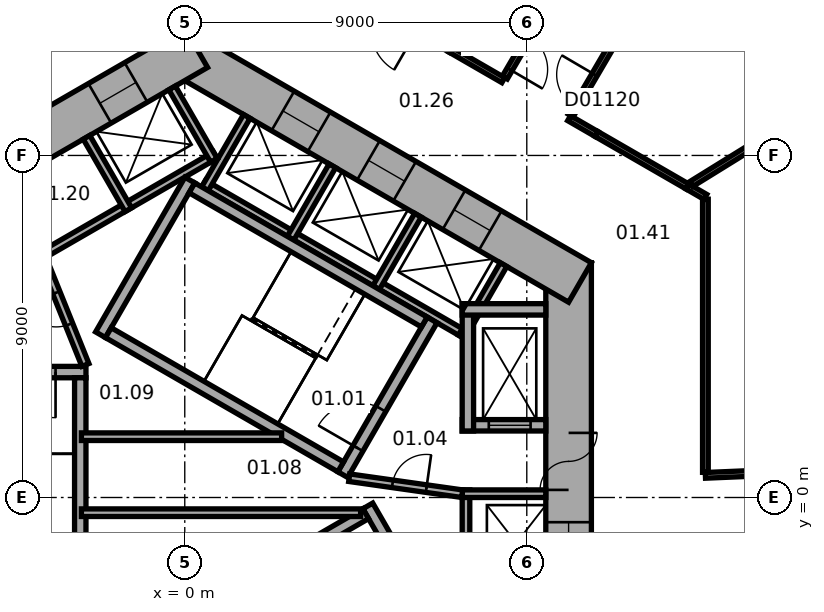
"""IFC4 building model, lengths in metres.
Left out: names, types, materials, properties, quantities, classifications, styles, units other than length and angle.
Written with IfcOpenShell. Run it as: python <this file> out.ifc"""

import sys

from ifc_helpers import new_model, si_unit, direction, frame, frame_2d, origin, place, context, subcontext, project, spatial, rectangle, extrude, element, fill, save


model = new_model("IFC4")
c1 = context("Model", 3, precision=1e-05, world=origin(), true_north=direction((0.0, 1.0)))
c2 = subcontext(c1, "Body", "Model", "MODEL_VIEW")
j1 = project(units=[si_unit("LENGTHUNIT", "METRE"), si_unit("PLANEANGLEUNIT", "RADIAN")], contexts=[c1])
p1 = place(None, origin())
s1 = spatial("IfcSite", under=j1, at=p1, CompositionType="ELEMENT")
p2 = place(p1, origin())
s2 = spatial("IfcBuilding", under=s1, at=p2, CompositionType="ELEMENT")
p3 = place(p2, frame((0.0, 0.0, 7.5)))
s3 = spatial("IfcBuildingStorey", under=s2, at=p3, CompositionType="ELEMENT", Elevation=7.5)
p4 = place(p3, frame((10.1, -6.177, 0.0), z_axis=(0.0, 0.0, 1.0), x_axis=(0.0, 1.0, 0.0)))
e1 = element("IfcWall", 1, at=p4, inside=s3, PredefinedType="SHEAR", context=c2, shape_type="SweptSolid", body=[
    extrude(rectangle(XDim=12.355, YDim=1.2, at=frame_2d((6.177, 0.0))), origin(), (0.0, 0.0, 1.0), 5.5),
])
p5 = place(p4, frame((6.378, 0.0, 0.0)))
e2 = element("IfcOpeningElement", 2, at=p5, cuts=e1, PredefinedType="OPENING", context=c2, shape_type="SweptSolid", body=[
    extrude(rectangle(XDim=1.5, YDim=2.1, at=frame_2d((0.75, 1.05))), frame((0.0, 0.61, 0.0), z_axis=(0.0, -1.0, 0.0), x_axis=(1.0, 0.0, 0.0)), (0.0, 0.0, 1.0), 1.22),
])
p6 = place(p4, frame((1.828, 0.0, 0.0)))
e3 = element("IfcOpeningElement", 3, at=p6, cuts=e1, PredefinedType="OPENING", context=c2, shape_type="SweptSolid", body=[
    extrude(rectangle(XDim=1.1, YDim=2.1, at=frame_2d((0.55, 1.05))), frame((0.0, 0.61, 0.0), z_axis=(0.0, -1.0, 0.0), x_axis=(1.0, 0.0, 0.0)), (0.0, 0.0, 1.0), 1.22),
])
p7 = place(p4, frame((4.427, 0.0, 0.0)))
e4 = element("IfcOpeningElement", 4, at=p7, cuts=e1, PredefinedType="OPENING", context=c2, shape_type="SweptSolid", body=[
    extrude(rectangle(XDim=1.1, YDim=2.1, at=frame_2d((0.55, 1.05))), frame((0.0, 0.61, 0.0), z_axis=(0.0, -1.0, 0.0), x_axis=(1.0, 0.0, 0.0)), (0.0, 0.0, 1.0), 1.22),
])
p8 = place(p3, frame((10.4, 5.658, 0.0), z_axis=(0.0, 0.0, 1.0), x_axis=(-0.866021384402, 0.500006961711, 0.0)))
e5 = element("IfcWall", 5, at=p8, inside=s3, PredefinedType="SHEAR", context=c2, shape_type="SweptSolid", body=[
    extrude(rectangle(XDim=12.355, YDim=1.2, at=frame_2d((6.178, 0.0))), origin(), (0.0, 0.0, 1.0), 5.5),
])
p9 = place(p8, frame((2.728, 0.0, 0.0)))
e6 = element("IfcOpeningElement", 6, at=p9, cuts=e5, PredefinedType="OPENING", context=c2, shape_type="SweptSolid", body=[
    extrude(rectangle(XDim=1.1, YDim=2.1, at=frame_2d((0.55, 1.05))), frame((0.0, 0.61, 0.0), z_axis=(0.0, -1.0, 0.0), x_axis=(1.0, 0.0, 0.0)), (0.0, 0.0, 1.0), 1.22),
])
p10 = place(p8, frame((5.328, 0.0, 0.0)))
e7 = element("IfcOpeningElement", 7, at=p10, cuts=e5, PredefinedType="OPENING", context=c2, shape_type="SweptSolid", body=[
    extrude(rectangle(XDim=1.1, YDim=2.1, at=frame_2d((0.55, 1.05))), frame((0.0, 0.61, 0.0), z_axis=(0.0, -1.0, 0.0), x_axis=(1.0, 0.0, 0.0)), (0.0, 0.0, 1.0), 1.22),
])
p11 = place(p8, frame((7.928, 0.0, 0.0)))
e8 = element("IfcOpeningElement", 8, at=p11, cuts=e5, PredefinedType="OPENING", context=c2, shape_type="SweptSolid", body=[
    extrude(rectangle(XDim=1.1, YDim=2.1, at=frame_2d((0.55, 1.05))), frame((0.0, 0.61, 0.0), z_axis=(0.0, -1.0, 0.0), x_axis=(1.0, 0.0, 0.0)), (0.0, 0.0, 1.0), 1.22),
])
p12 = place(p3, frame((0.3, 11.836, 0.0), z_axis=(0.0, 0.0, 1.0), x_axis=(-0.866021384402, -0.500006961711, 0.0)))
e9 = element("IfcWall", 9, at=p12, inside=s3, PredefinedType="SHEAR", context=c2, shape_type="SweptSolid", body=[
    extrude(rectangle(XDim=12.355, YDim=1.2, at=frame_2d((6.178, 0.0))), origin(), (0.0, 0.0, 1.0), 5.5),
])
p13 = place(p12, frame((6.378, 0.0, 0.0)))
e10 = element("IfcOpeningElement", 10, at=p13, cuts=e9, PredefinedType="OPENING", context=c2, shape_type="SweptSolid", body=[
    extrude(rectangle(XDim=1.5, YDim=2.1, at=frame_2d((0.75, 1.05))), frame((0.0, 0.61, 0.0), z_axis=(0.0, -1.0, 0.0), x_axis=(1.0, 0.0, 0.0)), (0.0, 0.0, 1.0), 1.22),
])
p14 = place(p12, frame((1.828, 0.0, 0.0)))
e11 = element("IfcOpeningElement", 11, at=p14, cuts=e9, PredefinedType="OPENING", context=c2, shape_type="SweptSolid", body=[
    extrude(rectangle(XDim=1.1, YDim=2.1, at=frame_2d((0.55, 1.05))), frame((0.0, 0.61, 0.0), z_axis=(0.0, -1.0, 0.0), x_axis=(1.0, 0.0, 0.0)), (0.0, 0.0, 1.0), 1.22),
])
p15 = place(p3, frame((7.4, -5.2, 0.0), z_axis=(0.0, 0.0, 1.0), x_axis=(0.0, 1.0, 0.0)))
e12 = element("IfcWall", 12, at=p15, inside=s3, PredefinedType="PARTITIONING", context=c2, shape_type="SweptSolid", body=[
    extrude(rectangle(XDim=5.4, YDim=0.2, at=frame_2d((2.7, 0.0))), origin(), (0.0, 0.0, 1.0), 5.2),
])
p16 = place(p3, frame((7.3, 0.1, 0.0), z_axis=(0.0, 0.0, 1.0), x_axis=(1.0, 0.0, 0.0)))
e13 = element("IfcWall", 13, at=p16, inside=s3, PredefinedType="PARTITIONING", context=c2, shape_type="SweptSolid", body=[
    extrude(rectangle(XDim=2.2, YDim=0.2, at=frame_2d((1.1, 0.0))), origin(), (0.0, 0.0, 1.0), 5.2),
])
p17 = place(p3, frame((7.424, 4.259, 0.0), z_axis=(0.0, 0.0, 1.0), x_axis=(-0.866026010844, 0.49999894854, 0.0)))
e14 = element("IfcWall", 14, at=p17, inside=s3, PredefinedType="PARTITIONING", context=c2, shape_type="SweptSolid", body=[
    extrude(rectangle(XDim=8.0, YDim=0.2, at=frame_2d((4.0, 0.0))), origin(), (0.0, 0.0, 1.0), 5.2),
])
for number, where, z_axis, x_axis in (
    (15, (7.287, 4.222, 0.0), (0.0, 0.0, 1.0), (0.5, 0.866, 0.0)),
    (16, (5.036, 5.522, 0.0), (0.0, 0.0, 1.0), (0.5, 0.866, 0.0)),
    (17, (2.784, 6.822, 0.0), (0.0, 0.0, 1.0), (0.5, 0.866, 0.0)),
    (18, (0.532, 8.122, 0.0), (0.0, 0.0, 1.0), (0.5, 0.866, 0.0)),
):
    element("IfcWall", number, at=place(p3, frame(where, z_axis=z_axis, x_axis=x_axis)), inside=s3, PredefinedType="PARTITIONING", context=c2, shape_type="SweptSolid", body=[
        extrude(rectangle(XDim=2.2, YDim=0.2, at=frame_2d((1.1, 0.0))), origin(), (0.0, 0.0, 1.0), 5.2),
    ])
p18 = place(p3, frame((0.803, 9.009, 0.0), z_axis=(0.0, 0.0, 1.0), x_axis=(-0.866028230842, -0.499995103361, 0.0)))
e19 = element("IfcWall", 19, at=p18, inside=s3, PredefinedType="PARTITIONING", context=c2, shape_type="SweptSolid", body=[
    extrude(rectangle(XDim=5.4, YDim=0.2, at=frame_2d((2.7, 0.0))), origin(), (0.0, 0.0, 1.0), 5.2),
])
p19 = place(p3, frame((0.767, 8.872, 0.0), z_axis=(0.0, 0.0, 1.0), x_axis=(-0.499994660107, 0.866028486751, 0.0)))
e20 = element("IfcWall", 20, at=p19, inside=s3, PredefinedType="PARTITIONING", context=c2, shape_type="SweptSolid", body=[
    extrude(rectangle(XDim=2.2, YDim=0.2, at=frame_2d((1.1, 0.0))), origin(), (0.0, 0.0, 1.0), 5.2),
])
p20 = place(p3, frame((-1.485, 7.572, 0.0), z_axis=(0.0, 0.0, 1.0), x_axis=(-0.50002983664, 0.866008176907, 0.0)))
e21 = element("IfcWall", 21, at=p20, inside=s3, PredefinedType="PARTITIONING", context=c2, shape_type="SweptSolid", body=[
    extrude(rectangle(XDim=2.2, YDim=0.2, at=frame_2d((1.1, 0.0))), origin(), (0.0, 0.0, 1.0), 5.2),
])
p21 = place(p3, frame((4.158, 0.602, 0.0), z_axis=(0.0, 0.0, 1.0), x_axis=(0.499977259774, 0.866038532462, 0.0)))
e22 = element("IfcWall", 22, at=p21, inside=s3, PredefinedType="SHEAR", context=c2, shape_type="SweptSolid", body=[
    extrude(rectangle(XDim=4.7, YDim=0.3, at=frame_2d((2.35, 0.0))), origin(), (0.0, 0.0, 1.0), 5.2),
])
p22 = place(p21, frame((0.8, 0.0, 0.0)))
e23 = element("IfcOpeningElement", 23, at=p22, cuts=e22, PredefinedType="OPENING", context=c2, shape_type="SweptSolid", body=[
    extrude(rectangle(XDim=1.2, YDim=2.1, at=frame_2d((0.6, 1.05))), frame((0.0, 0.16, 0.0), z_axis=(0.0, -1.0, 0.0), x_axis=(1.0, 0.0, 0.0)), (0.0, 0.0, 1.0), 0.32),
])
p23 = place(p3, frame((-2.216, 4.282, 0.0), z_axis=(0.0, 0.0, 1.0), x_axis=(0.499977259774, 0.866038532462, 0.0)))
e24 = element("IfcWall", 24, at=p23, inside=s3, PredefinedType="SHEAR", context=c2, shape_type="SweptSolid", body=[
    extrude(rectangle(XDim=4.7, YDim=0.3, at=frame_2d((2.35, 0.0))), origin(), (0.0, 0.0, 1.0), 5.2),
])
for number, where, z_axis, x_axis in (
    (25, (4.103, 0.807, 0.0), (0.0, 0.0, 1.0), (-0.866, 0.5, 0.0)),
    (26, (6.303, 4.617, 0.0), (0.0, 0.0, 1.0), (-0.866, 0.5, 0.0)),
):
    element("IfcWall", number, at=place(p3, frame(where, z_axis=z_axis, x_axis=x_axis)), inside=s3, PredefinedType="SHEAR", context=c2, shape_type="SweptSolid", body=[
        extrude(rectangle(XDim=7.06, YDim=0.3, at=frame_2d((3.53, 0.0))), origin(), (0.0, 0.0, 1.0), 5.2),
    ])
p24 = place(p3, frame((-2.6, 3.3, 0.0), z_axis=(0.0, 0.0, 1.0), x_axis=(-1.0, 0.0, 0.0)))
e27 = element("IfcWall", 27, at=p24, inside=s3, PredefinedType="SHEAR", context=c2, shape_type="SweptSolid", body=[
    extrude(rectangle(XDim=4.7, YDim=0.3, at=frame_2d((2.35, 0.0))), origin(), (0.0, 0.0, 1.0), 5.2),
])
p25 = place(p24, frame((0.8, 0.0, 0.0)))
e28 = element("IfcOpeningElement", 28, at=p25, cuts=e27, PredefinedType="OPENING", context=c2, shape_type="SweptSolid", body=[
    extrude(rectangle(XDim=1.2, YDim=2.1, at=frame_2d((0.6, 1.05))), frame((0.0, 0.16, 0.0), z_axis=(0.0, -1.0, 0.0), x_axis=(1.0, 0.0, 0.0)), (0.0, 0.0, 1.0), 0.32),
])
p26 = place(p3, frame((-2.75, 3.15, 0.0), z_axis=(0.0, 0.0, 1.0), x_axis=(0.0, -1.0, 0.0)))
e29 = element("IfcWall", 29, at=p26, inside=s3, PredefinedType="SHEAR", context=c2, shape_type="SweptSolid", body=[
    extrude(rectangle(XDim=7.06, YDim=0.3, at=frame_2d((3.53, 0.0))), origin(), (0.0, 0.0, 1.0), 5.2),
])
p27 = place(p3, frame((4.816, -0.222, 0.0), z_axis=(0.0, 0.0, 1.0), x_axis=(0.499977259774, -0.866038532462, 0.0)))
e30 = element("IfcWall", 30, at=p27, inside=s3, PredefinedType="SHEAR", context=c2, shape_type="SweptSolid", body=[
    extrude(rectangle(XDim=4.7, YDim=0.3, at=frame_2d((2.35, 0.0))), origin(), (0.0, 0.0, 1.0), 5.2),
])
p28 = place(p3, frame((-1.353, -3.957, 0.0), z_axis=(0.0, 0.0, 1.0), x_axis=(0.866027801685, 0.499995846692, 0.0)))
e31 = element("IfcWall", 31, at=p28, inside=s3, PredefinedType="SHEAR", context=c2, shape_type="SweptSolid", body=[
    extrude(rectangle(XDim=7.06, YDim=0.3, at=frame_2d((3.53, 0.0))), origin(), (0.0, 0.0, 1.0), 5.2),
])
p29 = place(p3, frame((7.3, 1.9, 0.0), z_axis=(0.0, 0.0, 1.0), x_axis=(1.0, 0.0, 0.0)))
e32 = element("IfcWall", 32, at=p29, inside=s3, PredefinedType="SHEAR", context=c2, shape_type="SweptSolid", body=[
    extrude(rectangle(XDim=2.2, YDim=0.3, at=frame_2d((1.1, 0.0))), origin(), (0.0, 0.0, 1.0), 5.2),
])
p30 = place(p29, frame((0.7, 0.0, 0.0)))
e33 = element("IfcOpeningElement", 33, at=p30, cuts=e32, PredefinedType="OPENING", context=c2, shape_type="SweptSolid", body=[
    extrude(rectangle(XDim=1.1, YDim=2.1, at=frame_2d((0.55, 1.05))), frame((0.0, 0.16, 0.0), z_axis=(0.0, -1.0, 0.0), x_axis=(1.0, 0.0, 0.0)), (0.0, 0.0, 1.0), 0.32),
])
p31 = place(p3, frame((7.45, 1.75, 0.0), z_axis=(0.0, 0.0, 1.0), x_axis=(0.0, 1.0, 0.0)))
e34 = element("IfcWall", 34, at=p31, inside=s3, PredefinedType="SHEAR", context=c2, shape_type="SweptSolid", body=[
    extrude(rectangle(XDim=3.35, YDim=0.3, at=frame_2d((1.675, 0.0))), origin(), (0.0, 0.0, 1.0), 5.2),
])
p32 = place(p3, frame((7.3, 4.95, 0.0), z_axis=(0.0, 0.0, 1.0), x_axis=(1.0, 0.0, 0.0)))
e35 = element("IfcWall", 35, at=p32, inside=s3, PredefinedType="SHEAR", context=c2, shape_type="SweptSolid", body=[
    extrude(rectangle(XDim=2.2, YDim=0.3, at=frame_2d((1.1, 0.0))), origin(), (0.0, 0.0, 1.0), 5.2),
])
p33 = place(p3, frame((4.327, 0.521, 0.0), z_axis=(0.0, 0.0, 1.0), x_axis=(0.990124376366, -0.14019172346, 0.0)))
e36 = element("IfcWall", 36, at=p33, inside=s3, PredefinedType="PARTITIONING", context=c2, shape_type="SweptSolid", body=[
    extrude(rectangle(XDim=3.002, YDim=0.2, at=frame_2d((1.501, 0.0))), origin(), (0.0, 0.0, 1.0), 5.2),
])
p34 = place(p33, frame((1.15, 0.0, 0.0)))
e37 = element("IfcOpeningElement", 37, at=p34, cuts=e36, PredefinedType="OPENING", context=c2, shape_type="SweptSolid", body=[
    extrude(rectangle(XDim=0.9, YDim=2.1, at=frame_2d((0.45, 1.05))), frame((0.0, 0.11, 0.0), z_axis=(0.0, -1.0, 0.0), x_axis=(1.0, 0.0, 0.0)), (0.0, 0.0, 1.0), 0.22),
])
p35 = place(p3, frame((-2.615, 3.487, 0.0), z_axis=(0.0, 0.0, 1.0), x_axis=(-0.373576831041, 0.92759924068, 0.0)))
e38 = element("IfcWall", 38, at=p35, inside=s3, PredefinedType="PARTITIONING", context=c2, shape_type="SweptSolid", body=[
    extrude(rectangle(XDim=3.002, YDim=0.2, at=frame_2d((1.501, 0.0))), origin(), (0.0, 0.0, 1.0), 5.2),
])
p36 = place(p35, frame((1.15, 0.0, 0.0)))
e39 = element("IfcOpeningElement", 39, at=p36, cuts=e38, PredefinedType="OPENING", context=c2, shape_type="SweptSolid", body=[
    extrude(rectangle(XDim=0.9, YDim=2.1, at=frame_2d((0.45, 1.05))), frame((0.0, 0.11, 0.0), z_axis=(0.0, -1.0, 0.0), x_axis=(1.0, 0.0, 0.0)), (0.0, 0.0, 1.0), 0.22),
])
p37 = place(p3, frame((-2.72, -0.4, 0.0), z_axis=(0.0, 0.0, 1.0), x_axis=(1.0, 0.0, 0.0)))
e40 = element("IfcWall", 40, at=p37, inside=s3, PredefinedType="PARTITIONING", context=c2, shape_type="SweptSolid", body=[
    extrude(rectangle(XDim=7.347, YDim=0.2, at=frame_2d((3.674, 0.0))), origin(), (0.0, 0.0, 1.0), 5.2),
])
p38 = place(p3, frame((-2.72, 1.6, 0.0), z_axis=(0.0, 0.0, 1.0), x_axis=(1.0, 0.0, 0.0)))
e41 = element("IfcWall", 41, at=p38, inside=s3, PredefinedType="PARTITIONING", context=c2, shape_type="SweptSolid", body=[
    extrude(rectangle(XDim=5.269, YDim=0.2, at=frame_2d((2.634, 0.0))), origin(), (0.0, 0.0, 1.0), 5.2),
])
p39 = place(p3, frame((21.15, 0.899, 0.0), z_axis=(0.0, 0.0, 1.0), x_axis=(-0.999097940345, -0.04246534585, 0.0)))
e42 = element("IfcWall", 42, at=p39, inside=s3, PredefinedType="PARTITIONING", context=c2, shape_type="SweptSolid", body=[
    extrude(rectangle(XDim=7.457, YDim=0.15, at=frame_2d((3.729, 0.0))), origin(), (0.0, 0.0, 1.0), 5.2),
])
p40 = place(p3, frame((13.7, 7.85, 0.0), z_axis=(0.0, 0.0, 1.0), x_axis=(0.0, -1.0, 0.0)))
e43 = element("IfcWall", 43, at=p40, inside=s3, PredefinedType="PARTITIONING", context=c2, shape_type="SweptSolid", body=[
    extrude(rectangle(XDim=7.187, YDim=0.15, at=frame_2d((3.594, 0.0))), origin(), (0.0, 0.0, 1.0), 5.2),
])
p41 = place(p3, frame((13.7, 7.909, 0.0), z_axis=(0.0, 0.0, 1.0), x_axis=(-0.865629350875, 0.50068535719, 0.0)))
e44 = element("IfcWall", 44, at=p41, inside=s3, PredefinedType="PARTITIONING", context=c2, shape_type="SweptSolid", body=[
    extrude(rectangle(XDim=0.549, YDim=0.15, at=frame_2d((0.274, 0.0))), origin(), (0.0, 0.0, 1.0), 5.2),
])
p42 = place(p3, frame((10.833, 9.564, 0.0), z_axis=(0.0, 0.0, 1.0), x_axis=(0.866091368387, -0.499885728548, 0.0)))
e45 = element("IfcWall", 45, at=p42, inside=s3, PredefinedType="PARTITIONING", context=c2, shape_type="SweptSolid", body=[
    extrude(rectangle(XDim=2.761, YDim=0.15, at=frame_2d((1.381, 0.0))), origin(), (0.0, 0.0, 1.0), 5.2),
])
p43 = place(p3, frame((10.114, 9.98, 0.0), z_axis=(0.0, 0.0, 1.0), x_axis=(0.865848115047, -0.500306947453, 0.0)))
e46 = element("IfcWall", 46, at=p43, inside=s3, PredefinedType="PARTITIONING", context=c2, shape_type="SweptSolid", body=[
    extrude(rectangle(XDim=0.832, YDim=0.15, at=frame_2d((0.416, 0.0))), origin(), (0.0, 0.0, 1.0), 5.2),
])
p44 = place(p3, frame((8.422, 11.05, 0.0), z_axis=(0.0, 0.0, 1.0), x_axis=(0.50561651199, 0.862758333952, 0.0)))
e47 = element("IfcWall", 47, at=p44, inside=s3, PredefinedType="PARTITIONING", context=c2, shape_type="SweptSolid", body=[
    extrude(rectangle(XDim=7.118, YDim=0.15, at=frame_2d((3.559, 0.0))), origin(), (0.0, 0.0, 1.0), 4.4),
])
p45 = place(p44, frame((0.25, 0.0, 0.0)))
e48 = element("IfcOpeningElement", 48, at=p45, cuts=e47, PredefinedType="OPENING", context=c2, shape_type="SweptSolid", body=[
    extrude(rectangle(XDim=1.0, YDim=2.1, at=frame_2d((0.5, 1.05))), frame((0.0, 0.085, 0.0), z_axis=(0.0, -1.0, 0.0), x_axis=(1.0, 0.0, 0.0)), (0.0, 0.0, 1.0), 0.17),
])
p46 = place(p3, frame((6.995, 11.781, 0.0), z_axis=(0.0, 0.0, 1.0), x_axis=(0.866076391369, -0.499911676512, 0.0)))
e49 = element("IfcWall", 49, at=p46, inside=s3, PredefinedType="PARTITIONING", context=c2, shape_type="SweptSolid", body=[
    extrude(rectangle(XDim=1.601, YDim=0.15, at=frame_2d((0.8, 0.0))), origin(), (0.0, 0.0, 1.0), 5.2),
])
p47 = place(p3, frame((6.995, 11.781, 0.0), z_axis=(0.0, 0.0, 1.0), x_axis=(-0.866281716711, 0.49955578997, 0.0)))
e50 = element("IfcWall", 50, at=p47, inside=s3, PredefinedType="PARTITIONING", context=c2, shape_type="SweptSolid", body=[
    extrude(rectangle(XDim=0.423, YDim=0.15, at=frame_2d((0.211, 0.0))), origin(), (0.0, 0.0, 1.0), 5.2),
])
p48 = place(p3, frame((19.949, 12.345, 0.0), z_axis=(0.0, 0.0, 1.0), x_axis=(-0.850341306025, -0.526231568102, 0.0)))
e51 = element("IfcWall", 51, at=p48, inside=s3, PredefinedType="PARTITIONING", context=c2, shape_type="SweptSolid", body=[
    extrude(rectangle(XDim=7.787, YDim=0.15, at=frame_2d((3.894, 0.0))), origin(), (0.0, 0.0, 1.0), 5.2),
])
p49 = place(p3, frame((13.772, 16.224, 0.0), z_axis=(0.0, 0.0, 1.0), x_axis=(-0.505547889018, -0.862798546539, 0.0)))
e52 = element("IfcWall", 52, at=p49, inside=s3, PredefinedType="PARTITIONING", context=c2, shape_type="SweptSolid", body=[
    extrude(rectangle(XDim=7.156, YDim=0.15, at=frame_2d((3.578, 0.0))), origin(), (0.0, 0.0, 1.0), 5.2),
])
p50 = place(p49, frame((5.906, 0.0, 0.0)))
e53 = element("IfcOpeningElement", 53, at=p50, cuts=e52, PredefinedType="OPENING", context=c2, shape_type="SweptSolid", body=[
    extrude(rectangle(XDim=1.0, YDim=2.1, at=frame_2d((0.5, 1.05))), frame((0.0, 0.085, 0.0), z_axis=(0.0, -1.0, 0.0), x_axis=(1.0, 0.0, 0.0)), (0.0, 0.0, 1.0), 0.17),
])
p51 = place(p5, origin())
e54 = element("IfcDoor", 54, at=p51, inside=s3, OperationType="DOUBLE_DOOR_SINGLE_SWING", PredefinedType="DOOR", context=c2, shape_type="SweptSolid", body=[
    extrude(rectangle(XDim=1.5, YDim=2.1, at=frame_2d((0.75, 1.05))), frame((0.0, 0.025, 0.0), z_axis=(0.0, -1.0, 0.0), x_axis=(1.0, 0.0, 0.0)), (0.0, 0.0, 1.0), 0.05),
])
fill(e2, e54)
p52 = place(p22, origin())
e55 = element("IfcDoor", 55, at=p52, inside=s3, OperationType="SINGLE_SWING_RIGHT", PredefinedType="DOOR", context=c2, shape_type="SweptSolid", body=[
    extrude(rectangle(XDim=1.2, YDim=2.1, at=frame_2d((0.6, 1.05))), frame((0.0, 0.025, 0.0), z_axis=(0.0, -1.0, 0.0), x_axis=(1.0, 0.0, 0.0)), (0.0, 0.0, 1.0), 0.05),
])
fill(e23, e55)
p53 = place(p25, origin())
e56 = element("IfcDoor", 56, at=p53, inside=s3, OperationType="SINGLE_SWING_RIGHT", PredefinedType="DOOR", context=c2, shape_type="SweptSolid", body=[
    extrude(rectangle(XDim=1.2, YDim=2.1, at=frame_2d((0.6, 1.05))), frame((0.0, 0.025, 0.0), z_axis=(0.0, -1.0, 0.0), x_axis=(1.0, 0.0, 0.0)), (0.0, 0.0, 1.0), 0.05),
])
fill(e28, e56)
p54 = place(p34, origin())
e57 = element("IfcDoor", 57, at=p54, inside=s3, OperationType="SINGLE_SWING_LEFT", PredefinedType="DOOR", context=c2, shape_type="SweptSolid", body=[
    extrude(rectangle(XDim=0.9, YDim=2.1, at=frame_2d((0.45, 1.05))), frame((0.0, 0.025, 0.0), z_axis=(0.0, -1.0, 0.0), x_axis=(1.0, 0.0, 0.0)), (0.0, 0.0, 1.0), 0.05),
])
fill(e37, e57)
p55 = place(p36, origin())
e58 = element("IfcDoor", 58, at=p55, inside=s3, OperationType="SINGLE_SWING_LEFT", PredefinedType="DOOR", context=c2, shape_type="SweptSolid", body=[
    extrude(rectangle(XDim=0.9, YDim=2.1, at=frame_2d((0.45, 1.05))), frame((0.0, 0.025, 0.0), z_axis=(0.0, -1.0, 0.0), x_axis=(1.0, 0.0, 0.0)), (0.0, 0.0, 1.0), 0.05),
])
fill(e39, e58)
p56 = place(p30, origin())
e59 = element("IfcDoor", 59, at=p56, inside=s3, OperationType="DOUBLE_DOOR_SLIDING", PredefinedType="DOOR", context=c2, shape_type="SweptSolid", body=[
    extrude(rectangle(XDim=1.1, YDim=2.1, at=frame_2d((0.55, 1.05))), frame((0.0, 0.025, 0.0), z_axis=(0.0, -1.0, 0.0), x_axis=(1.0, 0.0, 0.0)), (0.0, 0.0, 1.0), 0.05),
])
fill(e33, e59)
p57 = place(p7, origin())
e60 = element("IfcDoor", 60, at=p57, inside=s3, OperationType="DOUBLE_DOOR_SLIDING", PredefinedType="DOOR", context=c2, shape_type="SweptSolid", body=[
    extrude(rectangle(XDim=1.1, YDim=2.1, at=frame_2d((0.55, 1.05))), frame((0.0, 0.025, 0.0), z_axis=(0.0, -1.0, 0.0), x_axis=(1.0, 0.0, 0.0)), (0.0, 0.0, 1.0), 0.05),
])
fill(e4, e60)
p58 = place(p9, origin())
e61 = element("IfcDoor", 61, at=p58, inside=s3, OperationType="DOUBLE_DOOR_SLIDING", PredefinedType="DOOR", context=c2, shape_type="SweptSolid", body=[
    extrude(rectangle(XDim=1.1, YDim=2.1, at=frame_2d((0.55, 1.05))), frame((0.0, 0.025, 0.0), z_axis=(0.0, -1.0, 0.0), x_axis=(1.0, 0.0, 0.0)), (0.0, 0.0, 1.0), 0.05),
])
fill(e6, e61)
p59 = place(p10, origin())
e62 = element("IfcDoor", 62, at=p59, inside=s3, OperationType="DOUBLE_DOOR_SLIDING", PredefinedType="DOOR", context=c2, shape_type="SweptSolid", body=[
    extrude(rectangle(XDim=1.1, YDim=2.1, at=frame_2d((0.55, 1.05))), frame((0.0, 0.025, 0.0), z_axis=(0.0, -1.0, 0.0), x_axis=(1.0, 0.0, 0.0)), (0.0, 0.0, 1.0), 0.05),
])
fill(e7, e62)
p60 = place(p11, origin())
e63 = element("IfcDoor", 63, at=p60, inside=s3, OperationType="DOUBLE_DOOR_SLIDING", PredefinedType="DOOR", context=c2, shape_type="SweptSolid", body=[
    extrude(rectangle(XDim=1.1, YDim=2.1, at=frame_2d((0.55, 1.05))), frame((0.0, 0.025, 0.0), z_axis=(0.0, -1.0, 0.0), x_axis=(1.0, 0.0, 0.0)), (0.0, 0.0, 1.0), 0.05),
])
fill(e8, e63)
p61 = place(p14, origin())
e64 = element("IfcDoor", 64, at=p61, inside=s3, OperationType="DOUBLE_DOOR_SLIDING", PredefinedType="DOOR", context=c2, shape_type="SweptSolid", body=[
    extrude(rectangle(XDim=1.1, YDim=2.1, at=frame_2d((0.55, 1.05))), frame((0.0, 0.025, 0.0), z_axis=(0.0, -1.0, 0.0), x_axis=(1.0, 0.0, 0.0)), (0.0, 0.0, 1.0), 0.05),
])
fill(e11, e64)
p62 = place(p45, origin())
e65 = element("IfcDoor", 65, at=p62, inside=s3, OperationType="SINGLE_SWING_LEFT", PredefinedType="DOOR", context=c2, shape_type="SweptSolid", body=[
    extrude(rectangle(XDim=1.0, YDim=2.1, at=frame_2d((0.5, 1.05))), frame((0.0, 0.025, 0.0), z_axis=(0.0, -1.0, 0.0), x_axis=(1.0, 0.0, 0.0)), (0.0, 0.0, 1.0), 0.05),
])
fill(e48, e65)
p63 = place(p50, origin())
e66 = element("IfcDoor", 66, at=p63, inside=s3, OperationType="SINGLE_SWING_LEFT", PredefinedType="DOOR", context=c2, shape_type="SweptSolid", body=[
    extrude(rectangle(XDim=1.0, YDim=2.1, at=frame_2d((0.5, 1.05))), frame((0.0, 0.025, 0.0), z_axis=(0.0, -1.0, 0.0), x_axis=(1.0, 0.0, 0.0)), (0.0, 0.0, 1.0), 0.05),
])
fill(e53, e66)
save(model, sys.argv[1])
